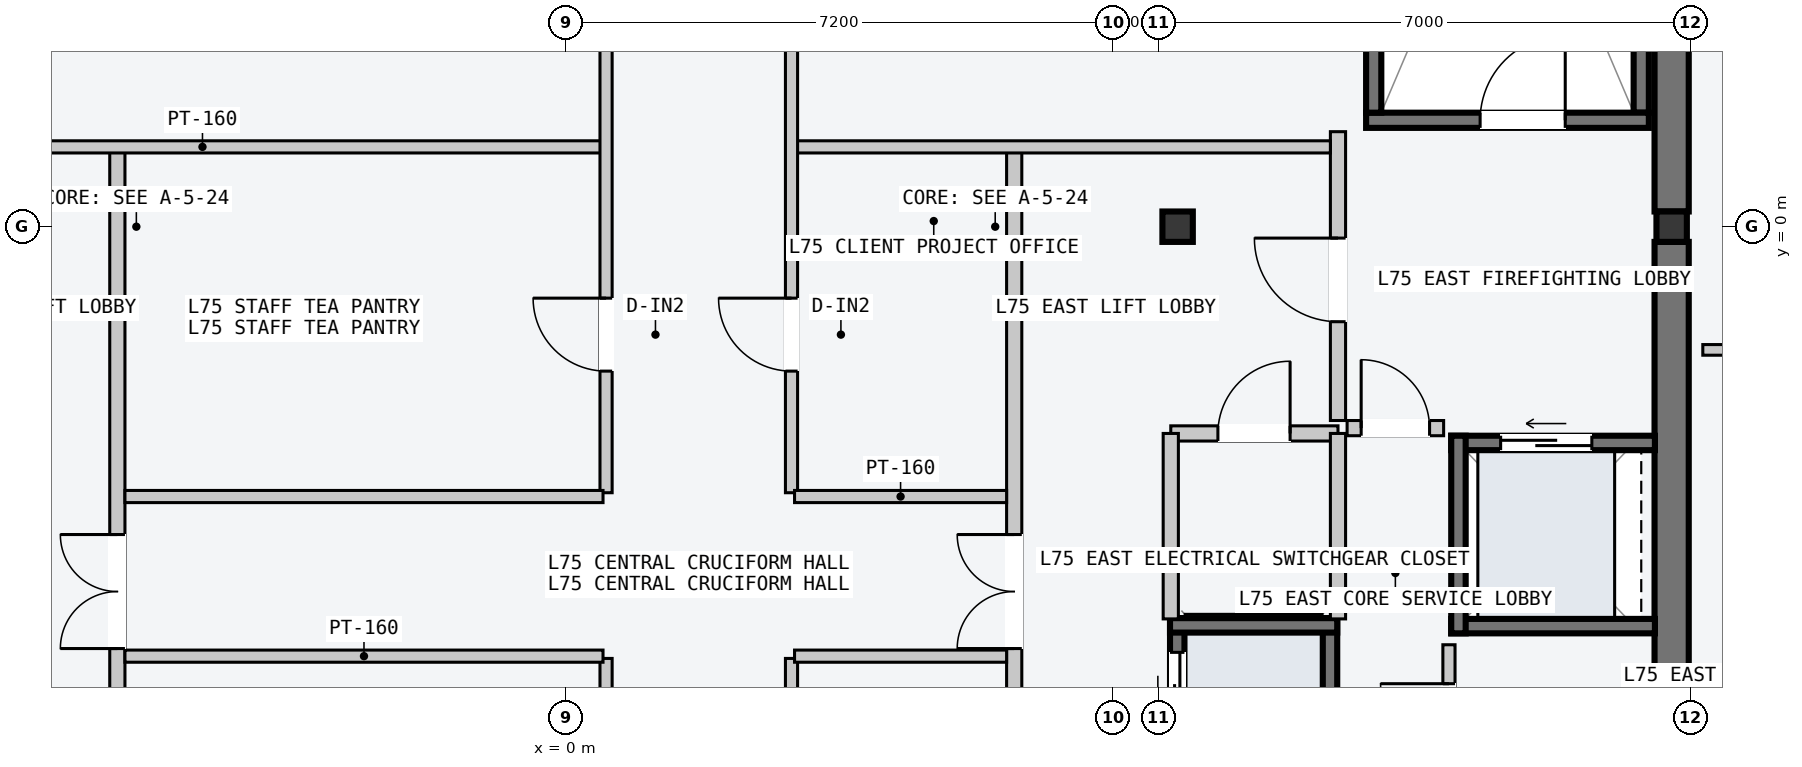
"""IFC4 building model, lengths in metres.
Left out: names, types, materials, properties, quantities, classifications, styles, units other than length and angle.
Written with IfcOpenShell. Run it as: python <this file> out.ifc"""

import sys

from ifc_helpers import new_model, si_unit, direction, frame, frame_2d, origin, origin_2d, place, context, subcontext, project, spatial, rectangle, i_section, extrude, element, fill, save


model = new_model("IFC4")
c1 = context("Model", 3, precision=1e-05, world=origin(), true_north=direction((0.0, 1.0)))
c2 = subcontext(c1, "Body", "Model", "MODEL_VIEW")
j1 = project(units=[si_unit("LENGTHUNIT", "METRE"), si_unit("PLANEANGLEUNIT", "RADIAN")], contexts=[c1])
p1 = place(None, origin())
s1 = spatial("IfcSite", under=j1, at=p1, CompositionType="ELEMENT")
p2 = place(p1, origin())
s2 = spatial("IfcBuilding", under=s1, at=p2, CompositionType="ELEMENT")
p3 = place(p2, frame((0.0, 0.0, 284.4)))
s3 = spatial("IfcBuildingStorey", under=s2, at=p3, CompositionType="ELEMENT", Elevation=284.4)
for number, where, z_axis, x_axis in (
    (1, (14.55, -9.55, -0.2), (0.0, 0.0, 1.0), (0.0, 1.0, 0.0)),
    (2, (14.55, 0.2, -0.2), (0.0, 0.0, 1.0), (0.0, 1.0, 0.0)),
):
    element("IfcWall", number, at=place(p3, frame(where, z_axis=z_axis, x_axis=x_axis)), inside=s3, PredefinedType="SHEAR", context=c2, shape_type="SweptSolid", body=[
        extrude(rectangle(XDim=9.35, YDim=0.45, at=frame_2d((4.675, 0.0))), origin(), (0.0, 0.0, 1.0), 4.8),
    ])
p4 = place(p3, frame((14.15, 1.5, -0.2), z_axis=(0.0, 0.0, 1.0), x_axis=(0.0, 1.0, 0.0)))
e3 = element("IfcWall", 3, at=p4, inside=s3, PredefinedType="SOLIDWALL", context=c2, shape_type="SweptSolid", body=[
    extrude(rectangle(XDim=7.8, YDim=0.2, at=frame_2d((3.9, 0.0))), origin(), (0.0, 0.0, 1.0), 4.8),
])
p5 = place(p3, frame((10.53, 1.4, -0.2), z_axis=(0.0, 0.0, 1.0), x_axis=(1.0, 0.0, 0.0)))
e4 = element("IfcWall", 4, at=p5, inside=s3, PredefinedType="SOLIDWALL", context=c2, shape_type="SweptSolid", body=[
    extrude(rectangle(XDim=3.72, YDim=0.2, at=frame_2d((1.86, 0.0))), origin(), (0.0, 0.0, 1.0), 4.8),
])
p6 = place(p5, frame((1.5, 0.0, 0.2)))
e5 = element("IfcOpeningElement", 5, at=p6, cuts=e4, PredefinedType="OPENING", context=c2, shape_type="SweptSolid", body=[
    extrude(rectangle(XDim=1.12, YDim=2.18, at=frame_2d((0.56, 1.09))), frame((0.0, 0.11, 0.0), z_axis=(0.0, -1.0, 0.0), x_axis=(1.0, 0.0, 0.0)), (0.0, 0.0, 1.0), 0.22),
])
p7 = place(p3, frame((10.63, 1.5, -0.2), z_axis=(0.0, 0.0, 1.0), x_axis=(0.0, 1.0, 0.0)))
e6 = element("IfcWall", 6, at=p7, inside=s3, PredefinedType="SOLIDWALL", context=c2, shape_type="SweptSolid", body=[
    extrude(rectangle(XDim=7.8, YDim=0.2, at=frame_2d((3.9, 0.0))), origin(), (0.0, 0.0, 1.0), 4.8),
])
for number, where, z_axis, x_axis in (
    (7, (8.05, 0.0, 0.0), (0.0, 0.0, 1.0), (1.0, 0.0, 0.0)),
    (8, (14.55, 0.0, 0.0), (0.0, 0.0, 1.0), (1.0, 0.0, 0.0)),
):
    element("IfcColumn", number, at=place(p3, frame(where, z_axis=z_axis, x_axis=x_axis)), inside=s3, PredefinedType="COLUMN", context=c2, shape_type="SweptSolid", body=[
        extrude(i_section(OverallWidth=0.4, OverallDepth=0.4, WebThickness=0.013, FlangeThickness=0.021, at=origin_2d()), origin(), (0.0, 0.0, 1.0), 4.8),
    ])
p8 = place(p3, frame((8.045, -7.15, -0.2), z_axis=(0.0, 0.0, 1.0), x_axis=(0.0, 1.0, 0.0)))
e9 = element("IfcWall", 9, at=p8, inside=s3, PredefinedType="SOLIDWALL", context=c2, shape_type="SweptSolid", body=[
    extrude(rectangle(XDim=2.0, YDim=0.19, at=frame_2d((1.0, 0.0))), origin(), (0.0, 0.0, 1.0), 4.8),
])
p9 = place(p8, frame((0.45, 0.0, 0.2)))
e10 = element("IfcOpeningElement", 10, at=p9, cuts=e9, PredefinedType="OPENING", context=c2, shape_type="SweptSolid", body=[
    extrude(rectangle(XDim=1.1, YDim=2.2, at=frame_2d((0.55, 1.1))), frame((0.0, 0.105, 0.0), z_axis=(0.0, -1.0, 0.0), x_axis=(1.0, 0.0, 0.0)), (0.0, 0.0, 1.0), 0.21),
])
p10 = place(p3, frame((10.055, -7.15, -0.2), z_axis=(0.0, 0.0, 1.0), x_axis=(0.0, 1.0, 0.0)))
e11 = element("IfcWall", 11, at=p10, inside=s3, PredefinedType="SOLIDWALL", context=c2, shape_type="SweptSolid", body=[
    extrude(rectangle(XDim=2.0, YDim=0.19, at=frame_2d((1.0, 0.0))), origin(), (0.0, 0.0, 1.0), 4.8),
])
p11 = place(p3, frame((7.95, -5.245, -0.2), z_axis=(0.0, 0.0, 1.0), x_axis=(1.0, 0.0, 0.0)))
e12 = element("IfcWall", 12, at=p11, inside=s3, PredefinedType="SOLIDWALL", context=c2, shape_type="SweptSolid", body=[
    extrude(rectangle(XDim=2.2, YDim=0.19, at=frame_2d((1.1, 0.0))), origin(), (0.0, 0.0, 1.0), 4.8),
])
p12 = place(p3, frame((11.65, -2.845, -0.2), z_axis=(0.0, 0.0, 1.0), x_axis=(1.0, 0.0, 0.0)))
e13 = element("IfcWall", 13, at=p12, inside=s3, PredefinedType="SOLIDWALL", context=c2, shape_type="SweptSolid", body=[
    extrude(rectangle(XDim=2.68, YDim=0.19, at=frame_2d((1.34, 0.0))), origin(), (0.0, 0.0, 1.0), 4.8),
])
p13 = place(p12, frame((0.65, 0.0, 0.2)))
e14 = element("IfcOpeningElement", 14, at=p13, cuts=e13, PredefinedType="OPENING", context=c2, shape_type="SweptSolid", body=[
    extrude(rectangle(XDim=1.2, YDim=2.2, at=frame_2d((0.6, 1.1))), frame((0.0, 0.105, 0.0), z_axis=(0.0, -1.0, 0.0), x_axis=(1.0, 0.0, 0.0)), (0.0, 0.0, 1.0), 0.21),
])
p14 = place(p3, frame((11.65, -5.255, -0.2), z_axis=(0.0, 0.0, 1.0), x_axis=(1.0, 0.0, 0.0)))
e15 = element("IfcWall", 15, at=p14, inside=s3, PredefinedType="SOLIDWALL", context=c2, shape_type="SweptSolid", body=[
    extrude(rectangle(XDim=2.68, YDim=0.19, at=frame_2d((1.34, 0.0))), origin(), (0.0, 0.0, 1.0), 4.8),
])
p15 = place(p3, frame((11.745, -5.35, -0.2), z_axis=(0.0, 0.0, 1.0), x_axis=(0.0, 1.0, 0.0)))
e16 = element("IfcWall", 16, at=p15, inside=s3, PredefinedType="SOLIDWALL", context=c2, shape_type="SweptSolid", body=[
    extrude(rectangle(XDim=2.6, YDim=0.19, at=frame_2d((1.3, 0.0))), origin(), (0.0, 0.0, 1.0), 4.8),
])
p16 = place(p3, frame((-5.9, -9.45, 0.0), z_axis=(0.0, 0.0, 1.0), x_axis=(0.0, 1.0, 0.0)))
e17 = element("IfcWall", 17, at=p16, inside=s3, PredefinedType="PARTITIONING", context=c2, shape_type="SweptSolid", body=[
    extrude(rectangle(XDim=10.5, YDim=0.2, at=frame_2d((5.25, 0.0))), origin(), (0.0, 0.0, 1.0), 4.6),
])
p17 = place(p16, frame((3.9, 0.0, 0.0)))
e18 = element("IfcOpeningElement", 18, at=p17, cuts=e17, PredefinedType="OPENING", context=c2, shape_type="SweptSolid", body=[
    extrude(rectangle(XDim=1.5, YDim=2.2, at=frame_2d((0.75, 1.1))), frame((0.0, 0.11, 0.0), z_axis=(0.0, -1.0, 0.0), x_axis=(1.0, 0.0, 0.0)), (0.0, 0.0, 1.0), 0.22),
])
p18 = place(p3, frame((5.9, -9.45, 0.0), z_axis=(0.0, 0.0, 1.0), x_axis=(0.0, 1.0, 0.0)))
e19 = element("IfcWall", 19, at=p18, inside=s3, PredefinedType="PARTITIONING", context=c2, shape_type="SweptSolid", body=[
    extrude(rectangle(XDim=10.5, YDim=0.2, at=frame_2d((5.25, 0.0))), origin(), (0.0, 0.0, 1.0), 4.6),
])
p19 = place(p18, frame((3.9, 0.0, 0.0)))
e20 = element("IfcOpeningElement", 20, at=p19, cuts=e19, PredefinedType="OPENING", context=c2, shape_type="SweptSolid", body=[
    extrude(rectangle(XDim=1.5, YDim=2.2, at=frame_2d((0.75, 1.1))), frame((0.0, 0.11, 0.0), z_axis=(0.0, -1.0, 0.0), x_axis=(1.0, 0.0, 0.0)), (0.0, 0.0, 1.0), 0.22),
])
p20 = place(p3, frame((10.16, -2.55, 0.0), z_axis=(0.0, 0.0, 1.0), x_axis=(0.0, 1.0, 0.0)))
e21 = element("IfcWall", 21, at=p20, inside=s3, PredefinedType="PARTITIONING", context=c2, shape_type="SweptSolid", body=[
    extrude(rectangle(XDim=3.8, YDim=0.2, at=frame_2d((1.9, 0.0))), origin(), (0.0, 0.0, 1.0), 4.6),
])
p21 = place(p20, frame((1.3, 0.0, 0.0)))
e22 = element("IfcOpeningElement", 22, at=p21, cuts=e21, PredefinedType="OPENING", context=c2, shape_type="SweptSolid", body=[
    extrude(rectangle(XDim=1.1, YDim=2.15, at=frame_2d((0.55, 1.075))), frame((0.0, 0.11, 0.0), z_axis=(0.0, -1.0, 0.0), x_axis=(1.0, 0.0, 0.0)), (0.0, 0.0, 1.0), 0.22),
])
p22 = place(p3, frame((10.28, -2.65, 0.0), z_axis=(0.0, 0.0, 1.0), x_axis=(1.0, 0.0, 0.0)))
e23 = element("IfcWall", 23, at=p22, inside=s3, PredefinedType="PARTITIONING", context=c2, shape_type="SweptSolid", body=[
    extrude(rectangle(XDim=1.27, YDim=0.2, at=frame_2d((0.635, 0.0))), origin(), (0.0, 0.0, 1.0), 4.6),
])
p23 = place(p22, frame((0.185, 0.0, 0.0)))
e24 = element("IfcOpeningElement", 24, at=p23, cuts=e23, PredefinedType="OPENING", context=c2, shape_type="SweptSolid", body=[
    extrude(rectangle(XDim=0.9, YDim=2.15, at=frame_2d((0.45, 1.075))), frame((0.0, 0.11, 0.0), z_axis=(0.0, -1.0, 0.0), x_axis=(1.0, 0.0, 0.0)), (0.0, 0.0, 1.0), 0.22),
])
p24 = place(p3, frame((7.96, -2.72, 0.0), z_axis=(0.0, 0.0, 1.0), x_axis=(1.0, 0.0, 0.0)))
e25 = element("IfcWall", 25, at=p24, inside=s3, PredefinedType="PARTITIONING", context=c2, shape_type="SweptSolid", body=[
    extrude(rectangle(XDim=2.2, YDim=0.2, at=frame_2d((1.1, 0.0))), origin(), (0.0, 0.0, 1.0), 4.6),
])
p25 = place(p24, frame((0.62, 0.0, 0.0)))
e26 = element("IfcOpeningElement", 26, at=p25, cuts=e25, PredefinedType="OPENING", context=c2, shape_type="SweptSolid", body=[
    extrude(rectangle(XDim=0.95, YDim=2.1, at=frame_2d((0.475, 1.05))), frame((0.0, 0.11, 0.0), z_axis=(0.0, -1.0, 0.0), x_axis=(1.0, 0.0, 0.0)), (0.0, 0.0, 1.0), 0.22),
])
for number, where, z_axis, x_axis in (
    (27, (7.96, -5.16, 0.0), (0.0, 0.0, 1.0), (0.0, 1.0, 0.0)),
    (28, (10.16, -5.16, 0.0), (0.0, 0.0, 1.0), (0.0, 1.0, 0.0)),
):
    element("IfcWall", number, at=place(p3, frame(where, z_axis=z_axis, x_axis=x_axis)), inside=s3, PredefinedType="PARTITIONING", context=c2, shape_type="SweptSolid", body=[
        extrude(rectangle(XDim=2.44, YDim=0.2, at=frame_2d((1.22, 0.0))), origin(), (0.0, 0.0, 1.0), 4.6),
    ])
p26 = place(p3, frame((11.62, -9.35, 0.0), z_axis=(0.0, 0.0, 1.0), x_axis=(0.0, 1.0, 0.0)))
e29 = element("IfcWall", 29, at=p26, inside=s3, PredefinedType="PARTITIONING", context=c2, shape_type="SweptSolid", body=[
    extrude(rectangle(XDim=3.85, YDim=0.16, at=frame_2d((1.925, 0.0))), origin(), (0.0, 0.0, 1.0), 4.6),
])
p27 = place(p26, frame((0.512, 0.0, 0.0)))
e30 = element("IfcOpeningElement", 30, at=p27, cuts=e29, PredefinedType="OPENING", context=c2, shape_type="SweptSolid", body=[
    extrude(rectangle(XDim=0.9, YDim=2.15, at=frame_2d((0.45, 1.075))), frame((0.0, 0.09, 0.0), z_axis=(0.0, -1.0, 0.0), x_axis=(1.0, 0.0, 0.0)), (0.0, 0.0, 1.0), 0.18),
])
p28 = place(p26, frame((2.438, 0.0, 0.0)))
e31 = element("IfcOpeningElement", 31, at=p28, cuts=e29, PredefinedType="OPENING", context=c2, shape_type="SweptSolid", body=[
    extrude(rectangle(XDim=0.9, YDim=2.15, at=frame_2d((0.45, 1.075))), frame((0.0, 0.09, 0.0), z_axis=(0.0, -1.0, 0.0), x_axis=(1.0, 0.0, 0.0)), (0.0, 0.0, 1.0), 0.18),
])
p29 = place(p3, frame((-10.05, 1.05, 0.0), z_axis=(0.0, 0.0, 1.0), x_axis=(1.0, 0.0, 0.0)))
e32 = element("IfcWall", 32, at=p29, inside=s3, PredefinedType="PARTITIONING", context=c2, shape_type="SweptSolid", body=[
    extrude(rectangle(XDim=10.54, YDim=0.16, at=frame_2d((5.27, 0.0))), origin(), (0.0, 0.0, 1.0), 4.6),
])
p30 = place(p3, frame((0.53, -3.5, 0.0), z_axis=(0.0, 0.0, 1.0), x_axis=(0.0, 1.0, 0.0)))
e33 = element("IfcWall", 33, at=p30, inside=s3, PredefinedType="PARTITIONING", context=c2, shape_type="SweptSolid", body=[
    extrude(rectangle(XDim=13.67, YDim=0.16, at=frame_2d((6.835, 0.0))), origin(), (0.0, 0.0, 1.0), 4.6),
])
p31 = place(p30, frame((6.1, 0.0, 0.0)))
e34 = element("IfcOpeningElement", 34, at=p31, cuts=e33, PredefinedType="OPENING", context=c2, shape_type="SweptSolid", body=[
    extrude(rectangle(XDim=1.24, YDim=2.24, at=frame_2d((0.62, 1.12))), frame((0.0, 0.09, 0.0), z_axis=(0.0, -1.0, 0.0), x_axis=(1.0, 0.0, 0.0)), (0.0, 0.0, 1.0), 0.18),
])
p32 = place(p30, frame((1.6, 0.0, 0.0)))
e35 = element("IfcOpeningElement", 35, at=p32, cuts=e33, PredefinedType="OPENING", context=c2, shape_type="SweptSolid", body=[
    extrude(rectangle(XDim=0.96, YDim=2.18, at=frame_2d((0.48, 1.09))), frame((0.0, 0.09, 0.0), z_axis=(0.0, -1.0, 0.0), x_axis=(1.0, 0.0, 0.0)), (0.0, 0.0, 1.0), 0.18),
])
p33 = place(p3, frame((-5.8, -3.55, 0.0), z_axis=(0.0, 0.0, 1.0), x_axis=(1.0, 0.0, 0.0)))
e36 = element("IfcWall", 36, at=p33, inside=s3, PredefinedType="PARTITIONING", context=c2, shape_type="SweptSolid", body=[
    extrude(rectangle(XDim=6.29, YDim=0.16, at=frame_2d((3.145, 0.0))), origin(), (0.0, 0.0, 1.0), 4.6),
])
p34 = place(p3, frame((3.01, 1.05, 0.0), z_axis=(0.0, 0.0, 1.0), x_axis=(1.0, 0.0, 0.0)))
e37 = element("IfcWall", 37, at=p34, inside=s3, PredefinedType="PARTITIONING", context=c2, shape_type="SweptSolid", body=[
    extrude(rectangle(XDim=7.05, YDim=0.16, at=frame_2d((3.525, 0.0))), origin(), (0.0, 0.0, 1.0), 4.6),
])
p35 = place(p3, frame((2.97, -3.5, 0.0), z_axis=(0.0, 0.0, 1.0), x_axis=(0.0, 1.0, 0.0)))
e38 = element("IfcWall", 38, at=p35, inside=s3, PredefinedType="PARTITIONING", context=c2, shape_type="SweptSolid", body=[
    extrude(rectangle(XDim=13.67, YDim=0.16, at=frame_2d((6.835, 0.0))), origin(), (0.0, 0.0, 1.0), 4.6),
])
p36 = place(p35, frame((6.1, 0.0, 0.0)))
e39 = element("IfcOpeningElement", 39, at=p36, cuts=e38, PredefinedType="OPENING", context=c2, shape_type="SweptSolid", body=[
    extrude(rectangle(XDim=1.24, YDim=2.24, at=frame_2d((0.62, 1.12))), frame((0.0, 0.09, 0.0), z_axis=(0.0, -1.0, 0.0), x_axis=(1.0, 0.0, 0.0)), (0.0, 0.0, 1.0), 0.18),
])
p37 = place(p35, frame((1.6, 0.0, 0.0)))
e40 = element("IfcOpeningElement", 40, at=p37, cuts=e38, PredefinedType="OPENING", context=c2, shape_type="SweptSolid", body=[
    extrude(rectangle(XDim=0.96, YDim=2.18, at=frame_2d((0.48, 1.09))), frame((0.0, 0.09, 0.0), z_axis=(0.0, -1.0, 0.0), x_axis=(1.0, 0.0, 0.0)), (0.0, 0.0, 1.0), 0.18),
])
p38 = place(p3, frame((3.01, -3.55, 0.0), z_axis=(0.0, 0.0, 1.0), x_axis=(1.0, 0.0, 0.0)))
e41 = element("IfcWall", 41, at=p38, inside=s3, PredefinedType="PARTITIONING", context=c2, shape_type="SweptSolid", body=[
    extrude(rectangle(XDim=2.79, YDim=0.16, at=frame_2d((1.395, 0.0))), origin(), (0.0, 0.0, 1.0), 4.6),
])
p39 = place(p3, frame((0.53, -10.17, 0.0), z_axis=(0.0, 0.0, 1.0), x_axis=(0.0, 1.0, 0.0)))
e42 = element("IfcWall", 42, at=p39, inside=s3, PredefinedType="PARTITIONING", context=c2, shape_type="SweptSolid", body=[
    extrude(rectangle(XDim=4.49, YDim=0.16, at=frame_2d((2.245, 0.0))), origin(), (0.0, 0.0, 1.0), 4.6),
])
p40 = place(p39, frame((1.15, 0.0, 0.0)))
e43 = element("IfcOpeningElement", 43, at=p40, cuts=e42, PredefinedType="OPENING", context=c2, shape_type="SweptSolid", body=[
    extrude(rectangle(XDim=0.96, YDim=2.18, at=frame_2d((0.48, 1.09))), frame((0.0, 0.09, 0.0), z_axis=(0.0, -1.0, 0.0), x_axis=(1.0, 0.0, 0.0)), (0.0, 0.0, 1.0), 0.18),
])
p41 = place(p3, frame((2.97, -10.17, 0.0), z_axis=(0.0, 0.0, 1.0), x_axis=(0.0, 1.0, 0.0)))
e44 = element("IfcWall", 44, at=p41, inside=s3, PredefinedType="PARTITIONING", context=c2, shape_type="SweptSolid", body=[
    extrude(rectangle(XDim=4.49, YDim=0.16, at=frame_2d((2.245, 0.0))), origin(), (0.0, 0.0, 1.0), 4.6),
])
p42 = place(p41, frame((1.15, 0.0, 0.0)))
e45 = element("IfcOpeningElement", 45, at=p42, cuts=e44, PredefinedType="OPENING", context=c2, shape_type="SweptSolid", body=[
    extrude(rectangle(XDim=0.96, YDim=2.18, at=frame_2d((0.48, 1.09))), frame((0.0, 0.09, 0.0), z_axis=(0.0, -1.0, 0.0), x_axis=(1.0, 0.0, 0.0)), (0.0, 0.0, 1.0), 0.18),
])
p43 = place(p3, frame((-5.8, -5.65, 0.0), z_axis=(0.0, 0.0, 1.0), x_axis=(1.0, 0.0, 0.0)))
e46 = element("IfcWall", 46, at=p43, inside=s3, PredefinedType="PARTITIONING", context=c2, shape_type="SweptSolid", body=[
    extrude(rectangle(XDim=6.29, YDim=0.16, at=frame_2d((3.145, 0.0))), origin(), (0.0, 0.0, 1.0), 4.6),
])
p44 = place(p3, frame((3.01, -5.65, 0.0), z_axis=(0.0, 0.0, 1.0), x_axis=(1.0, 0.0, 0.0)))
e47 = element("IfcWall", 47, at=p44, inside=s3, PredefinedType="PARTITIONING", context=c2, shape_type="SweptSolid", body=[
    extrude(rectangle(XDim=2.79, YDim=0.16, at=frame_2d((1.395, 0.0))), origin(), (0.0, 0.0, 1.0), 4.6),
])
p45 = place(p3, frame((14.96, -1.621, 0.0), z_axis=(0.0, 0.0, 1.0), x_axis=(1.0, 0.0, 0.0)))
e48 = element("IfcWall", 48, at=p45, inside=s3, PredefinedType="PARTITIONING", context=c2, shape_type="SweptSolid", body=[
    extrude(rectangle(XDim=3.6, YDim=0.14, at=frame_2d((1.8, 0.0))), origin(), (0.0, 0.0, 1.0), 4.6),
])
p46 = place(p45, frame((0.9, 0.0, 0.0)))
e49 = element("IfcOpeningElement", 49, at=p46, cuts=e48, PredefinedType="OPENING", context=c2, shape_type="SweptSolid", body=[
    extrude(rectangle(XDim=0.96, YDim=2.18, at=frame_2d((0.48, 1.09))), frame((0.0, 0.08, 0.0), z_axis=(0.0, -1.0, 0.0), x_axis=(1.0, 0.0, 0.0)), (0.0, 0.0, 1.0), 0.16),
])
p47 = place(p6, origin())
e50 = element("IfcDoor", 50, at=p47, inside=s3, OperationType="SINGLE_SWING_RIGHT", PredefinedType="DOOR", context=c2, shape_type="SweptSolid", body=[
    extrude(rectangle(XDim=1.12, YDim=2.18, at=frame_2d((0.56, 1.09))), frame((0.0, 0.025, 0.0), z_axis=(0.0, -1.0, 0.0), x_axis=(1.0, 0.0, 0.0)), (0.0, 0.0, 1.0), 0.05),
])
fill(e5, e50)
p48 = place(p9, origin())
e51 = element("IfcDoor", 51, at=p48, inside=s3, OperationType="SLIDING_TO_LEFT", PredefinedType="DOOR", context=c2, shape_type="SweptSolid", body=[
    extrude(rectangle(XDim=1.1, YDim=2.2, at=frame_2d((0.55, 1.1))), frame((0.0, 0.025, 0.0), z_axis=(0.0, -1.0, 0.0), x_axis=(1.0, 0.0, 0.0)), (0.0, 0.0, 1.0), 0.05),
])
fill(e10, e51)
p49 = place(p13, origin())
e52 = element("IfcDoor", 52, at=p49, inside=s3, OperationType="SLIDING_TO_LEFT", PredefinedType="DOOR", context=c2, shape_type="SweptSolid", body=[
    extrude(rectangle(XDim=1.2, YDim=2.2, at=frame_2d((0.6, 1.1))), frame((0.0, 0.025, 0.0), z_axis=(0.0, -1.0, 0.0), x_axis=(1.0, 0.0, 0.0)), (0.0, 0.0, 1.0), 0.05),
])
fill(e14, e52)
p50 = place(p17, origin())
e53 = element("IfcDoor", 53, at=p50, inside=s3, OperationType="DOUBLE_DOOR_SINGLE_SWING", PredefinedType="DOOR", context=c2, shape_type="SweptSolid", body=[
    extrude(rectangle(XDim=1.5, YDim=2.2, at=frame_2d((0.75, 1.1))), frame((0.0, 0.025, 0.0), z_axis=(0.0, -1.0, 0.0), x_axis=(1.0, 0.0, 0.0)), (0.0, 0.0, 1.0), 0.05),
])
fill(e18, e53)
p51 = place(p19, origin())
e54 = element("IfcDoor", 54, at=p51, inside=s3, OperationType="DOUBLE_DOOR_SINGLE_SWING", PredefinedType="DOOR", context=c2, shape_type="SweptSolid", body=[
    extrude(rectangle(XDim=1.5, YDim=2.2, at=frame_2d((0.75, 1.1))), frame((0.0, 0.025, 0.0), z_axis=(0.0, -1.0, 0.0), x_axis=(1.0, 0.0, 0.0)), (0.0, 0.0, 1.0), 0.05),
])
fill(e20, e54)
p52 = place(p21, origin())
e55 = element("IfcDoor", 55, at=p52, inside=s3, OperationType="SINGLE_SWING_RIGHT", PredefinedType="DOOR", context=c2, shape_type="SweptSolid", body=[
    extrude(rectangle(XDim=1.1, YDim=2.15, at=frame_2d((0.55, 1.075))), frame((0.0, 0.025, 0.0), z_axis=(0.0, -1.0, 0.0), x_axis=(1.0, 0.0, 0.0)), (0.0, 0.0, 1.0), 0.05),
])
fill(e22, e55)
p53 = place(p23, origin())
e56 = element("IfcDoor", 56, at=p53, inside=s3, OperationType="SINGLE_SWING_LEFT", PredefinedType="DOOR", context=c2, shape_type="SweptSolid", body=[
    extrude(rectangle(XDim=0.9, YDim=2.15, at=frame_2d((0.45, 1.075))), frame((0.0, 0.025, 0.0), z_axis=(0.0, -1.0, 0.0), x_axis=(1.0, 0.0, 0.0)), (0.0, 0.0, 1.0), 0.05),
])
fill(e24, e56)
p54 = place(p25, origin())
e57 = element("IfcDoor", 57, at=p54, inside=s3, OperationType="SINGLE_SWING_RIGHT", PredefinedType="DOOR", context=c2, shape_type="SweptSolid", body=[
    extrude(rectangle(XDim=0.95, YDim=2.1, at=frame_2d((0.475, 1.05))), frame((0.0, 0.025, 0.0), z_axis=(0.0, -1.0, 0.0), x_axis=(1.0, 0.0, 0.0)), (0.0, 0.0, 1.0), 0.05),
])
fill(e26, e57)
p55 = place(p28, origin())
e58 = element("IfcDoor", 58, at=p55, inside=s3, OperationType="SINGLE_SWING_RIGHT", PredefinedType="DOOR", context=c2, shape_type="SweptSolid", body=[
    extrude(rectangle(XDim=0.9, YDim=2.15, at=frame_2d((0.45, 1.075))), frame((0.0, 0.025, 0.0), z_axis=(0.0, -1.0, 0.0), x_axis=(1.0, 0.0, 0.0)), (0.0, 0.0, 1.0), 0.05),
])
fill(e31, e58)
p56 = place(p32, origin())
e59 = element("IfcDoor", 59, at=p56, inside=s3, OperationType="SINGLE_SWING_RIGHT", PredefinedType="DOOR", context=c2, shape_type="SweptSolid", body=[
    extrude(rectangle(XDim=0.96, YDim=2.18, at=frame_2d((0.48, 1.09))), frame((0.0, 0.025, 0.0), z_axis=(0.0, -1.0, 0.0), x_axis=(1.0, 0.0, 0.0)), (0.0, 0.0, 1.0), 0.05),
])
fill(e35, e59)
p57 = place(p37, origin())
e60 = element("IfcDoor", 60, at=p57, inside=s3, OperationType="SINGLE_SWING_RIGHT", PredefinedType="DOOR", context=c2, shape_type="SweptSolid", body=[
    extrude(rectangle(XDim=0.96, YDim=2.18, at=frame_2d((0.48, 1.09))), frame((0.0, 0.025, 0.0), z_axis=(0.0, -1.0, 0.0), x_axis=(1.0, 0.0, 0.0)), (0.0, 0.0, 1.0), 0.05),
])
fill(e40, e60)
save(model, sys.argv[1])
